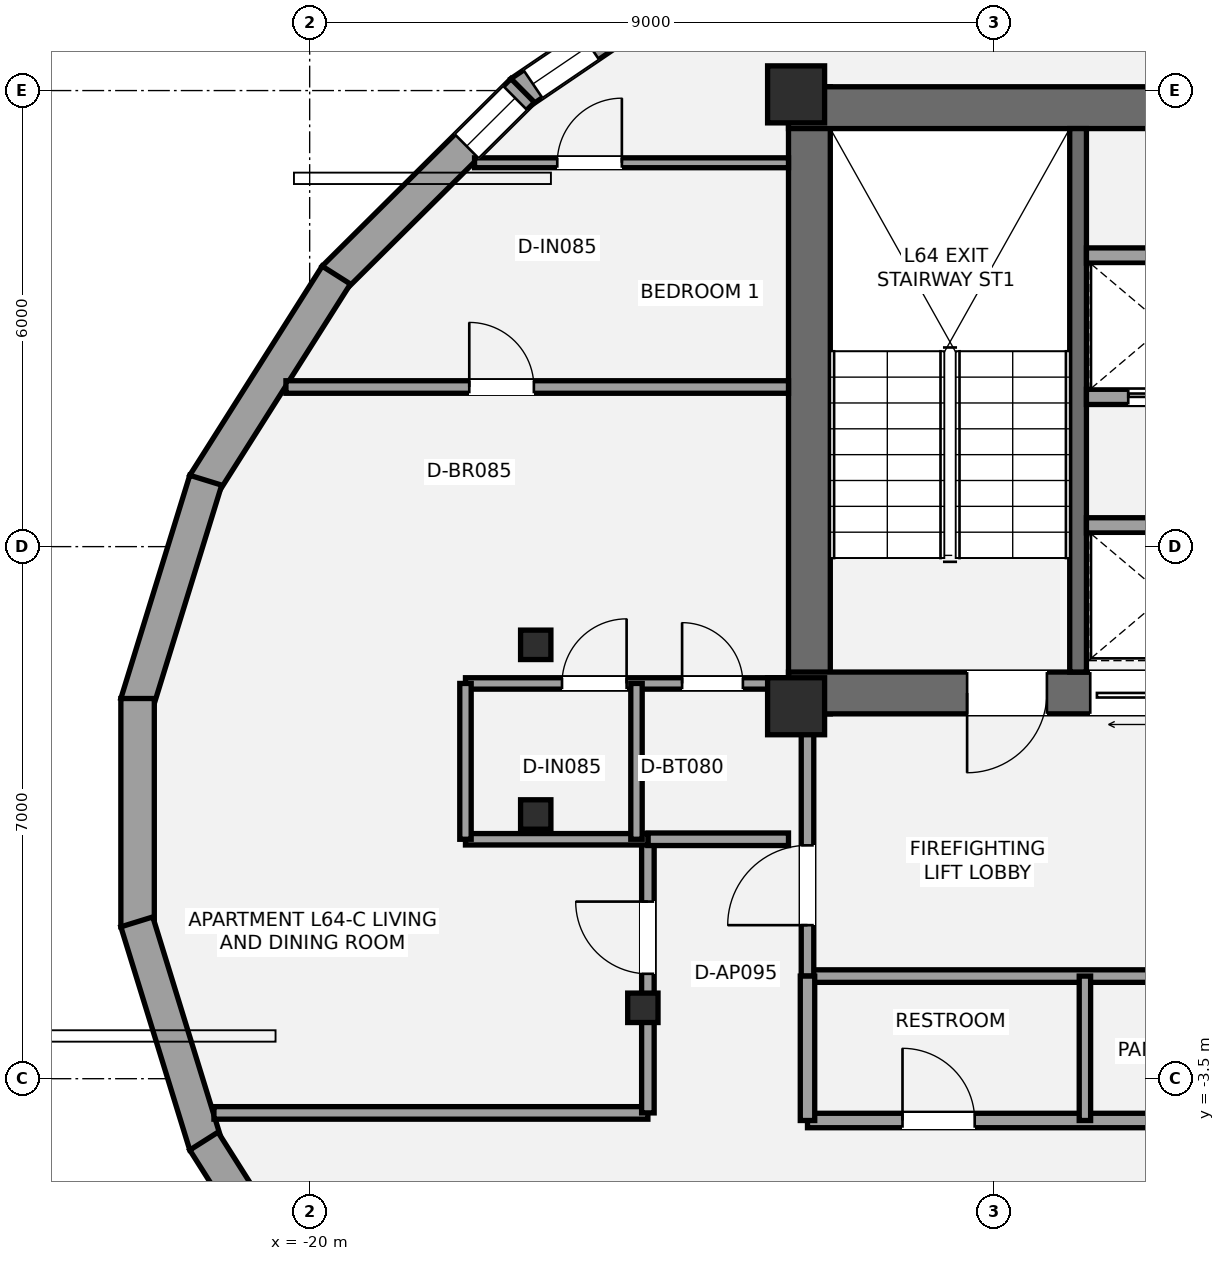
"""IFC4 building model, lengths in metres.
Left out: names, types, materials, properties, quantities, classifications, styles, units other than length and angle.
Written with IfcOpenShell. Run it as: python <this file> out.ifc"""

import sys

from ifc_helpers import new_model, si_unit, direction, frame, frame_2d, origin, origin_2d, place, context, subcontext, project, spatial, rectangle, i_section, extrude, element, fill, save


model = new_model("IFC4")
c1 = context("Model", 3, precision=1e-05, world=origin(), true_north=direction((0.0, 1.0)))
c2 = subcontext(c1, "Body", "Model", "MODEL_VIEW")
j1 = project(units=[si_unit("LENGTHUNIT", "METRE"), si_unit("PLANEANGLEUNIT", "RADIAN")], contexts=[c1])
p1 = place(None, origin())
s1 = spatial("IfcSite", under=j1, at=p1, CompositionType="ELEMENT")
p2 = place(p1, origin())
s2 = spatial("IfcBuilding", under=s1, at=p2, CompositionType="ELEMENT")
p3 = place(p2, frame((0.0, 0.0, 228.9)))
s3 = spatial("IfcBuildingStorey", under=s2, at=p3, CompositionType="ELEMENT", Elevation=228.9)
p4 = place(p3, frame((-13.425, 1.3, 0.0), z_axis=(0.0, 0.0, 1.0), x_axis=(0.0, 1.0, 0.0)))
e1 = element("IfcWall", 1, at=p4, inside=s3, PredefinedType="SHEAR", context=c2, shape_type="SweptSolid", body=[
    extrude(rectangle(XDim=8.25, YDim=0.55, at=frame_2d((4.125, 0.0))), origin(), (0.0, 0.0, 1.0), 3.15),
])
p5 = place(p3, frame((-13.7, 9.275, 0.0), z_axis=(0.0, 0.0, 1.0), x_axis=(1.0, 0.0, 0.0)))
e2 = element("IfcWall", 2, at=p5, inside=s3, PredefinedType="SHEAR", context=c2, shape_type="SweptSolid", body=[
    extrude(rectangle(XDim=9.175, YDim=0.55, at=frame_2d((4.587, 0.0))), origin(), (0.0, 0.0, 1.0), 3.15),
])
p6 = place(p3, frame((-4.925, 1.575, 0.0), z_axis=(0.0, 0.0, 1.0), x_axis=(-1.0, 0.0, 0.0)))
e3 = element("IfcWall", 3, at=p6, inside=s3, PredefinedType="SHEAR", context=c2, shape_type="SweptSolid", body=[
    extrude(rectangle(XDim=8.775, YDim=0.55, at=frame_2d((4.387, 0.0))), origin(), (0.0, 0.0, 1.0), 3.15),
])
p7 = place(p6, frame((5.375, 0.0, 0.0)))
e4 = element("IfcOpeningElement", 4, at=p7, cuts=e3, PredefinedType="OPENING", context=c2, shape_type="SweptSolid", body=[
    extrude(rectangle(XDim=1.05, YDim=2.15, at=frame_2d((0.525, 1.075))), frame((0.0, 0.285, 0.0), z_axis=(0.0, -1.0, 0.0), x_axis=(1.0, 0.0, 0.0)), (0.0, 0.0, 1.0), 0.57),
])
p8 = place(p6, frame((3.705, 0.0, 0.0)))
e5 = element("IfcOpeningElement", 5, at=p8, cuts=e3, PredefinedType="OPENING", context=c2, shape_type="SweptSolid", body=[
    extrude(rectangle(XDim=1.1, YDim=2.2, at=frame_2d((0.55, 1.1))), frame((0.0, 0.285, 0.0), z_axis=(0.0, -1.0, 0.0), x_axis=(1.0, 0.0, 0.0)), (0.0, 0.0, 1.0), 0.57),
])
p9 = place(p3, frame((-9.89, 1.85, 0.0), z_axis=(0.0, 0.0, 1.0), x_axis=(0.0, 1.0, 0.0)))
e6 = element("IfcWall", 6, at=p9, inside=s3, PredefinedType="SHEAR", context=c2, shape_type="SweptSolid", body=[
    extrude(rectangle(XDim=7.15, YDim=0.22, at=frame_2d((3.575, 0.0))), origin(), (0.0, 0.0, 1.0), 3.15),
])
for number, where, z_axis, x_axis in (
    (7, (-13.6, 1.4, 0.0), (0.0, 0.0, 1.0), (1.0, 0.0, 0.0)),
    (8, (-13.6, 9.45, 0.0), (0.0, 0.0, 1.0), (1.0, 0.0, 0.0)),
):
    element("IfcColumn", number, at=place(p3, frame(where, z_axis=z_axis, x_axis=x_axis)), inside=s3, PredefinedType="PILASTER", context=c2, shape_type="SweptSolid", body=[
        extrude(rectangle(XDim=0.75, YDim=0.75, at=origin_2d()), origin(), (0.0, 0.0, 1.0), 3.15),
    ])
for number, where, z_axis, x_axis in (
    (9, (-17.026, 2.208, 0.0), (0.0, 0.0, 1.0), (1.0, 0.0, 0.0)),
    (10, (-17.026, -0.024, 0.0), (0.0, 0.0, 1.0), (1.0, 0.0, 0.0)),
    (11, (-15.616, -2.567, 0.0), (0.0, 0.0, 1.0), (1.0, 0.0, 0.0)),
):
    element("IfcColumn", number, at=place(p3, frame(where, z_axis=z_axis, x_axis=x_axis)), inside=s3, PredefinedType="COLUMN", context=c2, shape_type="SweptSolid", body=[
        extrude(i_section(OverallWidth=0.399, OverallDepth=0.387, WebThickness=0.021, FlangeThickness=0.033, at=origin_2d()), origin(), (0.0, 0.0, 1.0), 3.15),
    ])
p10 = place(p3, frame((-17.228, 9.475, 0.0), z_axis=(0.0, 0.0, 1.0), x_axis=(0.827638454008, 0.561261605178, 0.0)))
e12 = element("IfcWall", 12, at=p10, inside=s3, PredefinedType="STANDARD", context=c2, shape_type="SweptSolid", body=[
    extrude(rectangle(XDim=3.76, YDim=0.44, at=frame_2d((1.88, 0.0))), origin(), (0.0, 0.0, 1.0), 2.336),
])
p11 = place(p10, frame((0.2, 0.0, 0.42)))
e13 = element("IfcOpeningElement", 13, at=p11, cuts=e12, PredefinedType="OPENING", context=c2, shape_type="SweptSolid", body=[
    extrude(rectangle(XDim=0.9, YDim=1.35, at=frame_2d((0.45, 0.675))), frame((0.0, 0.23, 0.0), z_axis=(0.0, -1.0, 0.0), x_axis=(1.0, 0.0, 0.0)), (0.0, 0.0, 1.0), 0.46),
])
p12 = place(p3, frame((-19.681, 7.034, 0.0), z_axis=(0.0, 0.0, 1.0), x_axis=(0.709543258305, 0.704661879623, 0.0)))
e14 = element("IfcWall", 14, at=p12, inside=s3, PredefinedType="STANDARD", context=c2, shape_type="SweptSolid", body=[
    extrude(rectangle(XDim=3.501, YDim=0.44, at=frame_2d((1.75, 0.0))), origin(), (0.0, 0.0, 1.0), 2.336),
])
p13 = place(p12, frame((2.461, 0.0, 0.42)))
e15 = element("IfcOpeningElement", 15, at=p13, cuts=e14, PredefinedType="OPENING", context=c2, shape_type="SweptSolid", body=[
    extrude(rectangle(XDim=0.9, YDim=1.35, at=frame_2d((0.45, 0.675))), frame((0.0, 0.23, 0.0), z_axis=(0.0, -1.0, 0.0), x_axis=(1.0, 0.0, 0.0)), (0.0, 0.0, 1.0), 0.46),
])
p14 = place(p3, frame((-21.392, 4.321, 0.0), z_axis=(0.0, 0.0, 1.0), x_axis=(0.53485586517, 0.844943313775, 0.0)))
e16 = element("IfcWall", 16, at=p14, inside=s3, PredefinedType="STANDARD", context=c2, shape_type="SweptSolid", body=[
    extrude(rectangle(XDim=3.256, YDim=0.44, at=frame_2d((1.628, 0.0))), origin(), (0.0, 0.0, 1.0), 2.336),
])
p15 = place(p3, frame((-22.274, 1.437, 0.0), z_axis=(0.0, 0.0, 1.0), x_axis=(0.295012279945, 0.95549346135, 0.0)))
e17 = element("IfcWall", 17, at=p15, inside=s3, PredefinedType="STANDARD", context=c2, shape_type="SweptSolid", body=[
    extrude(rectangle(XDim=3.073, YDim=0.44, at=frame_2d((1.537, 0.0))), origin(), (0.0, 0.0, 1.0), 2.336),
])
p16 = place(p3, frame((-22.264, -1.502, 0.0), z_axis=(0.0, 0.0, 1.0), x_axis=(0.0, 1.0, 0.0)))
e18 = element("IfcWall", 18, at=p16, inside=s3, PredefinedType="STANDARD", context=c2, shape_type="SweptSolid", body=[
    extrude(rectangle(XDim=3.003, YDim=0.44, at=frame_2d((1.502, 0.0))), origin(), (0.0, 0.0, 1.0), 2.336),
])
p17 = place(p3, frame((-21.367, -4.374, 0.0), z_axis=(0.0, 0.0, 1.0), x_axis=(-0.295012279945, 0.95549346135, 0.0)))
e19 = element("IfcWall", 19, at=p17, inside=s3, PredefinedType="STANDARD", context=c2, shape_type="SweptSolid", body=[
    extrude(rectangle(XDim=3.073, YDim=0.44, at=frame_2d((1.537, 0.0))), origin(), (0.0, 0.0, 1.0), 2.336),
])
p18 = place(p3, frame((-19.65, -7.073, 0.0), z_axis=(0.0, 0.0, 1.0), x_axis=(-0.53485586517, 0.844943313775, 0.0)))
e20 = element("IfcWall", 20, at=p18, inside=s3, PredefinedType="STANDARD", context=c2, shape_type="SweptSolid", body=[
    extrude(rectangle(XDim=3.256, YDim=0.44, at=frame_2d((1.628, 0.0))), origin(), (0.0, 0.0, 1.0), 2.336),
])
p19 = place(p3, frame((-13.45, -2.15, 0.0), z_axis=(0.0, 0.0, 1.0), x_axis=(1.0, 0.0, 0.0)))
e21 = element("IfcWall", 21, at=p19, inside=s3, PredefinedType="PARTITIONING", context=c2, shape_type="SweptSolid", body=[
    extrude(rectangle(XDim=6.25, YDim=0.165, at=frame_2d((3.125, 0.0))), origin(), (0.0, 0.0, 1.0), 2.423),
])
p20 = place(p3, frame((-13.45, -2.15, 0.0), z_axis=(0.0, 0.0, 1.0), x_axis=(0.0, 1.0, 0.0)))
e22 = element("IfcWall", 22, at=p20, inside=s3, PredefinedType="PARTITIONING", context=c2, shape_type="SweptSolid", body=[
    extrude(rectangle(XDim=3.5, YDim=0.165, at=frame_2d((1.75, 0.0))), origin(), (0.0, 0.0, 1.0), 2.423),
])
p21 = place(p20, frame((0.67, 0.0, 0.0)))
e23 = element("IfcOpeningElement", 23, at=p21, cuts=e22, PredefinedType="OPENING", context=c2, shape_type="SweptSolid", body=[
    extrude(rectangle(XDim=1.05, YDim=2.15, at=frame_2d((0.525, 1.075))), frame((0.0, 0.093, 0.0), z_axis=(0.0, -1.0, 0.0), x_axis=(1.0, 0.0, 0.0)), (0.0, 0.0, 1.0), 0.185),
])
p22 = place(p3, frame((-9.78, 3.78, 0.0), z_axis=(0.0, 0.0, 1.0), x_axis=(1.0, 0.0, 0.0)))
e24 = element("IfcWall", 24, at=p22, inside=s3, PredefinedType="SOLIDWALL", context=c2, shape_type="SweptSolid", body=[
    extrude(rectangle(XDim=4.305, YDim=0.2, at=frame_2d((2.152, 0.0))), origin(), (0.0, 0.0, 1.0), 2.97),
])
p23 = place(p22, frame((2.72, 0.0, 0.0)))
e25 = element("IfcOpeningElement", 25, at=p23, cuts=e24, PredefinedType="OPENING", context=c2, shape_type="SweptSolid", body=[
    extrude(rectangle(XDim=1.1, YDim=2.2, at=frame_2d((0.55, 1.1))), frame((0.0, 0.11, 0.0), z_axis=(0.0, -1.0, 0.0), x_axis=(1.0, 0.0, 0.0)), (0.0, 0.0, 1.0), 0.22),
])
p24 = place(p3, frame((-9.78, 5.47, 0.0), z_axis=(0.0, 0.0, 1.0), x_axis=(1.0, 0.0, 0.0)))
e26 = element("IfcWall", 26, at=p24, inside=s3, PredefinedType="SOLIDWALL", context=c2, shape_type="SweptSolid", body=[
    extrude(rectangle(XDim=4.305, YDim=0.2, at=frame_2d((2.152, 0.0))), origin(), (0.0, 0.0, 1.0), 2.97),
])
p25 = place(p24, frame((0.55, 0.0, 0.0)))
e27 = element("IfcOpeningElement", 27, at=p25, cuts=e26, PredefinedType="OPENING", context=c2, shape_type="SweptSolid", body=[
    extrude(rectangle(XDim=1.1, YDim=2.2, at=frame_2d((0.55, 1.1))), frame((0.0, 0.11, 0.0), z_axis=(0.0, -1.0, 0.0), x_axis=(1.0, 0.0, 0.0)), (0.0, 0.0, 1.0), 0.22),
])
p26 = place(p24, frame((2.72, 0.0, 0.0)))
e28 = element("IfcOpeningElement", 28, at=p26, cuts=e26, PredefinedType="OPENING", context=c2, shape_type="SweptSolid", body=[
    extrude(rectangle(XDim=1.1, YDim=2.2, at=frame_2d((0.55, 1.1))), frame((0.0, 0.11, 0.0), z_axis=(0.0, -1.0, 0.0), x_axis=(1.0, 0.0, 0.0)), (0.0, 0.0, 1.0), 0.22),
])
p27 = place(p3, frame((-9.78, 7.33, 0.0), z_axis=(0.0, 0.0, 1.0), x_axis=(1.0, 0.0, 0.0)))
e29 = element("IfcWall", 29, at=p27, inside=s3, PredefinedType="SOLIDWALL", context=c2, shape_type="SweptSolid", body=[
    extrude(rectangle(XDim=4.305, YDim=0.2, at=frame_2d((2.152, 0.0))), origin(), (0.0, 0.0, 1.0), 2.97),
])
p28 = place(p3, frame((-13.45, -4.05, 0.0), z_axis=(0.0, 0.0, 1.0), x_axis=(1.0, 0.0, 0.0)))
e30 = element("IfcWall", 30, at=p28, inside=s3, PredefinedType="PLUMBINGWALL", context=c2, shape_type="SweptSolid", body=[
    extrude(rectangle(XDim=11.35, YDim=0.19, at=frame_2d((5.675, 0.0))), origin(), (0.0, 0.0, 1.0), 2.357),
])
p29 = place(p28, frame((1.25, 0.0, 0.0)))
e31 = element("IfcOpeningElement", 31, at=p29, cuts=e30, PredefinedType="OPENING", context=c2, shape_type="SweptSolid", body=[
    extrude(rectangle(XDim=0.95, YDim=2.15, at=frame_2d((0.475, 1.075))), frame((0.0, 0.105, 0.0), z_axis=(0.0, -1.0, 0.0), x_axis=(1.0, 0.0, 0.0)), (0.0, 0.0, 1.0), 0.21),
])
p30 = place(p28, frame((6.16, 0.0, 0.0)))
e32 = element("IfcOpeningElement", 32, at=p30, cuts=e30, PredefinedType="OPENING", context=c2, shape_type="SweptSolid", body=[
    extrude(rectangle(XDim=0.9, YDim=2.1, at=frame_2d((0.45, 1.05))), frame((0.0, 0.105, 0.0), z_axis=(0.0, -1.0, 0.0), x_axis=(1.0, 0.0, 0.0)), (0.0, 0.0, 1.0), 0.21),
])
p31 = place(p3, frame((-13.45, -4.05, 0.0), z_axis=(0.0, 0.0, 1.0), x_axis=(0.0, 1.0, 0.0)))
e33 = element("IfcWall", 33, at=p31, inside=s3, PredefinedType="PLUMBINGWALL", context=c2, shape_type="SweptSolid", body=[
    extrude(rectangle(XDim=1.9, YDim=0.19, at=frame_2d((0.95, 0.0))), origin(), (0.0, 0.0, 1.0), 2.423),
])
p32 = place(p3, frame((-9.8, -4.05, 0.0), z_axis=(0.0, 0.0, 1.0), x_axis=(0.0, 1.0, 0.0)))
e34 = element("IfcWall", 34, at=p32, inside=s3, PredefinedType="PLUMBINGWALL", context=c2, shape_type="SweptSolid", body=[
    extrude(rectangle(XDim=1.9, YDim=0.15, at=frame_2d((0.95, 0.0))), origin(), (0.0, 0.0, 1.0), 2.97),
])
p33 = place(p3, frame((-21.26, -3.95, 0.0), z_axis=(0.0, 0.0, 1.0), x_axis=(1.0, 0.0, 0.0)))
e35 = element("IfcWall", 35, at=p33, inside=s3, PredefinedType="PARTITIONING", context=c2, shape_type="SweptSolid", body=[
    extrude(rectangle(XDim=5.709, YDim=0.165, at=frame_2d((2.855, 0.0))), origin(), (0.0, 0.0, 1.0), 2.423),
])
p34 = place(p3, frame((-15.55, -3.95, 0.0), z_axis=(0.0, 0.0, 1.0), x_axis=(0.0, 1.0, 0.0)))
e36 = element("IfcWall", 36, at=p34, inside=s3, PredefinedType="PARTITIONING", context=c2, shape_type="SweptSolid", body=[
    extrude(rectangle(XDim=3.6, YDim=0.165, at=frame_2d((1.8, 0.0))), origin(), (0.0, 0.0, 1.0), 2.357),
])
p35 = place(p34, frame((1.83, 0.0, 0.0)))
e37 = element("IfcOpeningElement", 37, at=p35, cuts=e36, PredefinedType="OPENING", context=c2, shape_type="SweptSolid", body=[
    extrude(rectangle(XDim=0.95, YDim=2.15, at=frame_2d((0.475, 1.075))), frame((0.0, 0.093, 0.0), z_axis=(0.0, -1.0, 0.0), x_axis=(1.0, 0.0, 0.0)), (0.0, 0.0, 1.0), 0.185),
])
p36 = place(p3, frame((-15.55, -0.35, 0.0), z_axis=(0.0, 0.0, 1.0), x_axis=(1.0, 0.0, 0.0)))
e38 = element("IfcWall", 38, at=p36, inside=s3, PredefinedType="PARTITIONING", context=c2, shape_type="SweptSolid", body=[
    extrude(rectangle(XDim=1.85, YDim=0.165, at=frame_2d((0.925, 0.0))), origin(), (0.0, 0.0, 1.0), 2.97),
])
p37 = place(p3, frame((-20.312, 5.6, 0.0), z_axis=(0.0, 0.0, 1.0), x_axis=(1.0, 0.0, 0.0)))
e39 = element("IfcWall", 39, at=p37, inside=s3, PredefinedType="PARTITIONING", context=c2, shape_type="SweptSolid", body=[
    extrude(rectangle(XDim=6.612, YDim=0.165, at=frame_2d((3.306, 0.0))), origin(), (0.0, 0.0, 1.0), 2.423),
])
p38 = place(p37, frame((2.412, 0.0, 0.0)))
e40 = element("IfcOpeningElement", 40, at=p38, cuts=e39, PredefinedType="OPENING", context=c2, shape_type="SweptSolid", body=[
    extrude(rectangle(XDim=0.85, YDim=2.1, at=frame_2d((0.425, 1.05))), frame((0.0, 0.093, 0.0), z_axis=(0.0, -1.0, 0.0), x_axis=(1.0, 0.0, 0.0)), (0.0, 0.0, 1.0), 0.185),
])
p39 = place(p3, frame((-17.95, 1.7, 0.0), z_axis=(0.0, 0.0, 1.0), x_axis=(1.0, 0.0, 0.0)))
e41 = element("IfcWall", 41, at=p39, inside=s3, PredefinedType="PLUMBINGWALL", context=c2, shape_type="SweptSolid", body=[
    extrude(rectangle(XDim=4.25, YDim=0.15, at=frame_2d((2.125, 0.0))), origin(), (0.0, 0.0, 1.0), 2.423),
])
p40 = place(p39, frame((2.85, 0.0, 0.0)))
e42 = element("IfcOpeningElement", 42, at=p40, cuts=e41, PredefinedType="OPENING", context=c2, shape_type="SweptSolid", body=[
    extrude(rectangle(XDim=0.8, YDim=2.1, at=frame_2d((0.4, 1.05))), frame((0.0, 0.085, 0.0), z_axis=(0.0, -1.0, 0.0), x_axis=(1.0, 0.0, 0.0)), (0.0, 0.0, 1.0), 0.17),
])
p41 = place(p39, frame((1.27, 0.0, 0.0)))
e43 = element("IfcOpeningElement", 43, at=p41, cuts=e41, PredefinedType="OPENING", context=c2, shape_type="SweptSolid", body=[
    extrude(rectangle(XDim=0.85, YDim=2.1, at=frame_2d((0.425, 1.05))), frame((0.0, 0.085, 0.0), z_axis=(0.0, -1.0, 0.0), x_axis=(1.0, 0.0, 0.0)), (0.0, 0.0, 1.0), 0.17),
])
p42 = place(p3, frame((-17.95, -0.35, 0.0), z_axis=(0.0, 0.0, 1.0), x_axis=(1.0, 0.0, 0.0)))
e44 = element("IfcWall", 44, at=p42, inside=s3, PredefinedType="PLUMBINGWALL", context=c2, shape_type="SweptSolid", body=[
    extrude(rectangle(XDim=2.4, YDim=0.15, at=frame_2d((1.2, 0.0))), origin(), (0.0, 0.0, 1.0), 2.423),
])
p43 = place(p3, frame((-15.7, -0.35, 0.0), z_axis=(0.0, 0.0, 1.0), x_axis=(0.0, 1.0, 0.0)))
e45 = element("IfcWall", 45, at=p43, inside=s3, PredefinedType="PLUMBINGWALL", context=c2, shape_type="SweptSolid", body=[
    extrude(rectangle(XDim=2.05, YDim=0.15, at=frame_2d((1.025, 0.0))), origin(), (0.0, 0.0, 1.0), 2.423),
])
p44 = place(p3, frame((-17.95, -0.35, 0.0), z_axis=(0.0, 0.0, 1.0), x_axis=(0.0, 1.0, 0.0)))
e46 = element("IfcWall", 46, at=p44, inside=s3, PredefinedType="PLUMBINGWALL", context=c2, shape_type="SweptSolid", body=[
    extrude(rectangle(XDim=2.05, YDim=0.15, at=frame_2d((1.025, 0.0))), origin(), (0.0, 0.0, 1.0), 2.97),
])
p45 = place(p3, frame((-17.831, 8.55, 0.0), z_axis=(0.0, 0.0, 1.0), x_axis=(1.0, 0.0, 0.0)))
e47 = element("IfcWall", 47, at=p45, inside=s3, PredefinedType="PARTITIONING", context=c2, shape_type="SweptSolid", body=[
    extrude(rectangle(XDim=4.131, YDim=0.13, at=frame_2d((2.065, 0.0))), origin(), (0.0, 0.0, 1.0), 2.423),
])
p46 = place(p45, frame((1.088, 0.0, 0.0)))
e48 = element("IfcOpeningElement", 48, at=p46, cuts=e47, PredefinedType="OPENING", context=c2, shape_type="SweptSolid", body=[
    extrude(rectangle(XDim=0.85, YDim=2.1, at=frame_2d((0.425, 1.05))), frame((0.0, 0.075, 0.0), z_axis=(0.0, -1.0, 0.0), x_axis=(1.0, 0.0, 0.0)), (0.0, 0.0, 1.0), 0.15),
])
p47 = place(p11, origin())
e49 = element("IfcWindow", 49, at=p47, inside=s3, PartitioningType="SINGLE_PANEL", PredefinedType="WINDOW", context=c2, shape_type="SweptSolid", body=[
    extrude(rectangle(XDim=0.9, YDim=1.35, at=frame_2d((0.45, 0.675))), frame((0.0, -0.01, 0.0), z_axis=(0.0, -1.0, 0.0), x_axis=(1.0, 0.0, 0.0)), (0.0, 0.0, 1.0), 0.06),
])
fill(e13, e49)
p48 = place(p13, origin())
e50 = element("IfcWindow", 50, at=p48, inside=s3, PartitioningType="SINGLE_PANEL", PredefinedType="WINDOW", context=c2, shape_type="SweptSolid", body=[
    extrude(rectangle(XDim=0.9, YDim=1.35, at=frame_2d((0.45, 0.675))), frame((0.0, -0.01, 0.0), z_axis=(0.0, -1.0, 0.0), x_axis=(1.0, 0.0, 0.0)), (0.0, 0.0, 1.0), 0.06),
])
fill(e15, e50)
p49 = place(p7, origin())
e51 = element("IfcDoor", 51, at=p49, inside=s3, OperationType="SINGLE_SWING_RIGHT", PredefinedType="DOOR", context=c2, shape_type="SweptSolid", body=[
    extrude(rectangle(XDim=1.05, YDim=2.15, at=frame_2d((0.525, 1.075))), frame((0.0, 0.025, 0.0), z_axis=(0.0, -1.0, 0.0), x_axis=(1.0, 0.0, 0.0)), (0.0, 0.0, 1.0), 0.05),
])
fill(e4, e51)
p50 = place(p21, origin())
e52 = element("IfcDoor", 52, at=p50, inside=s3, OperationType="SINGLE_SWING_LEFT", PredefinedType="DOOR", context=c2, shape_type="SweptSolid", body=[
    extrude(rectangle(XDim=1.05, YDim=2.15, at=frame_2d((0.525, 1.075))), frame((0.0, 0.025, 0.0), z_axis=(0.0, -1.0, 0.0), x_axis=(1.0, 0.0, 0.0)), (0.0, 0.0, 1.0), 0.05),
])
fill(e23, e52)
p51 = place(p8, origin())
e53 = element("IfcDoor", 53, at=p51, inside=s3, OperationType="SLIDING_TO_LEFT", PredefinedType="DOOR", context=c2, shape_type="SweptSolid", body=[
    extrude(rectangle(XDim=1.1, YDim=2.2, at=frame_2d((0.55, 1.1))), frame((0.0, 0.025, 0.0), z_axis=(0.0, -1.0, 0.0), x_axis=(1.0, 0.0, 0.0)), (0.0, 0.0, 1.0), 0.05),
])
fill(e5, e53)
p52 = place(p25, origin())
e54 = element("IfcDoor", 54, at=p52, inside=s3, OperationType="SLIDING_TO_LEFT", PredefinedType="DOOR", context=c2, shape_type="SweptSolid", body=[
    extrude(rectangle(XDim=1.1, YDim=2.2, at=frame_2d((0.55, 1.1))), frame((0.0, 0.025, 0.0), z_axis=(0.0, -1.0, 0.0), x_axis=(1.0, 0.0, 0.0)), (0.0, 0.0, 1.0), 0.05),
])
fill(e27, e54)
p53 = place(p29, origin())
e55 = element("IfcDoor", 55, at=p53, inside=s3, OperationType="SINGLE_SWING_LEFT", PredefinedType="DOOR", context=c2, shape_type="SweptSolid", body=[
    extrude(rectangle(XDim=0.95, YDim=2.15, at=frame_2d((0.475, 1.075))), frame((0.0, 0.025, 0.0), z_axis=(0.0, -1.0, 0.0), x_axis=(1.0, 0.0, 0.0)), (0.0, 0.0, 1.0), 0.05),
])
fill(e31, e55)
p54 = place(p35, origin())
e56 = element("IfcDoor", 56, at=p54, inside=s3, OperationType="SINGLE_SWING_RIGHT", PredefinedType="DOOR", context=c2, shape_type="SweptSolid", body=[
    extrude(rectangle(XDim=0.95, YDim=2.15, at=frame_2d((0.475, 1.075))), frame((0.0, 0.025, 0.0), z_axis=(0.0, -1.0, 0.0), x_axis=(1.0, 0.0, 0.0)), (0.0, 0.0, 1.0), 0.05),
])
fill(e37, e56)
p55 = place(p40, origin())
e57 = element("IfcDoor", 57, at=p55, inside=s3, OperationType="SINGLE_SWING_LEFT", PredefinedType="DOOR", context=c2, shape_type="SweptSolid", body=[
    extrude(rectangle(XDim=0.8, YDim=2.1, at=frame_2d((0.4, 1.05))), frame((0.0, 0.025, 0.0), z_axis=(0.0, -1.0, 0.0), x_axis=(1.0, 0.0, 0.0)), (0.0, 0.0, 1.0), 0.05),
])
fill(e42, e57)
p56 = place(p41, origin())
e58 = element("IfcDoor", 58, at=p56, inside=s3, OperationType="SINGLE_SWING_RIGHT", PredefinedType="DOOR", context=c2, shape_type="SweptSolid", body=[
    extrude(rectangle(XDim=0.85, YDim=2.1, at=frame_2d((0.425, 1.05))), frame((0.0, 0.025, 0.0), z_axis=(0.0, -1.0, 0.0), x_axis=(1.0, 0.0, 0.0)), (0.0, 0.0, 1.0), 0.05),
])
fill(e43, e58)
p57 = place(p38, origin())
e59 = element("IfcDoor", 59, at=p57, inside=s3, OperationType="SINGLE_SWING_LEFT", PredefinedType="DOOR", context=c2, shape_type="SweptSolid", body=[
    extrude(rectangle(XDim=0.85, YDim=2.1, at=frame_2d((0.425, 1.05))), frame((0.0, 0.025, 0.0), z_axis=(0.0, -1.0, 0.0), x_axis=(1.0, 0.0, 0.0)), (0.0, 0.0, 1.0), 0.05),
])
fill(e40, e59)
p58 = place(p46, origin())
e60 = element("IfcDoor", 60, at=p58, inside=s3, OperationType="SINGLE_SWING_RIGHT", PredefinedType="DOOR", context=c2, shape_type="SweptSolid", body=[
    extrude(rectangle(XDim=0.85, YDim=2.1, at=frame_2d((0.425, 1.05))), frame((0.0, 0.025, 0.0), z_axis=(0.0, -1.0, 0.0), x_axis=(1.0, 0.0, 0.0)), (0.0, 0.0, 1.0), 0.05),
])
fill(e48, e60)
save(model, sys.argv[1])
